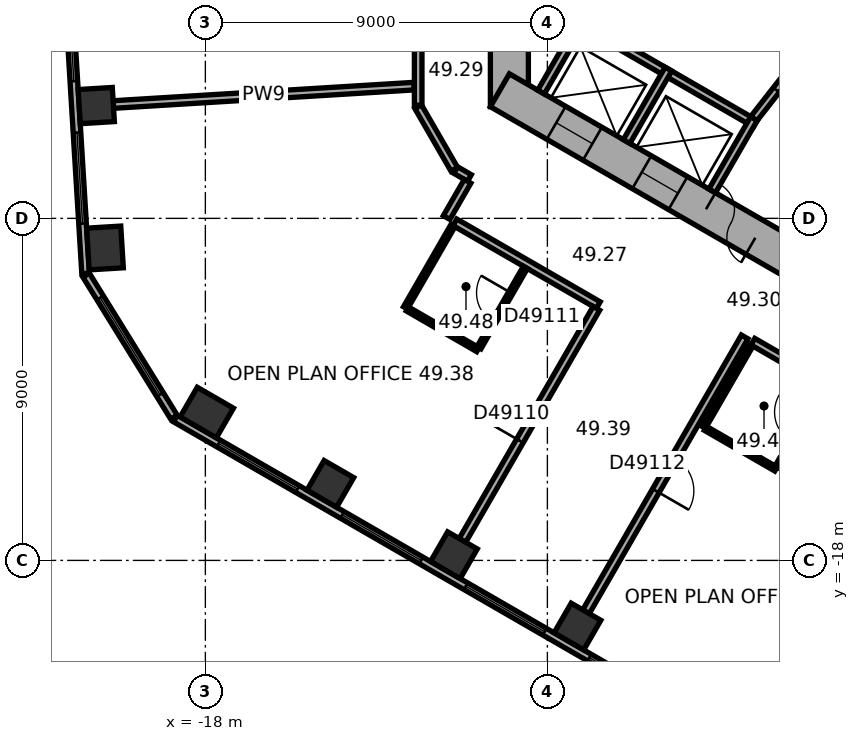
"""IFC4 building model, lengths in metres.
Left out: names, types, materials, properties, quantities, classifications, styles, units other than length and angle.
Written with IfcOpenShell. Run it as: python <this file> out.ifc"""

import sys

from ifc_helpers import new_model, si_unit, direction, frame, frame_2d, origin, origin_2d, place, context, subcontext, project, spatial, rectangle, extrude, element, fill, save


model = new_model("IFC4")
c1 = context("Model", 3, precision=1e-05, world=origin(), true_north=direction((0.0, 1.0)))
c2 = subcontext(c1, "Body", "Model", "MODEL_VIEW")
j1 = project(units=[si_unit("LENGTHUNIT", "METRE"), si_unit("PLANEANGLEUNIT", "RADIAN")], contexts=[c1])
p1 = place(None, origin())
s1 = spatial("IfcSite", under=j1, at=p1, CompositionType="ELEMENT")
p2 = place(p1, origin())
s2 = spatial("IfcBuilding", under=s1, at=p2, CompositionType="ELEMENT")
p3 = place(p2, frame((0.0, 0.0, 198.4)))
s3 = spatial("IfcBuildingStorey", under=s2, at=p3, CompositionType="ELEMENT", Elevation=198.4)
p4 = place(p3, frame((-20.871, -6.032, 0.0), z_axis=(0.0, 0.0, 1.0), x_axis=(0.061048539535, -0.998134798422, 0.0)))
e1 = element("IfcColumn", 1, at=p4, inside=s3, PredefinedType="COLUMN", context=c2, shape_type="SweptSolid", body=[
    extrude(rectangle(XDim=0.9, YDim=0.9, at=origin_2d()), origin(), (0.0, 0.0, 1.0), 3.7),
])
for number, where, z_axis, x_axis in (
    (2, (-20.642, -9.779, 0.0), (0.0, 0.0, 1.0), (0.061, -0.998, 0.0)),
    (3, (-17.962, -14.109, 0.0), (0.0, 0.0, 1.0), (0.866, -0.5, 0.0)),
):
    element("IfcColumn", number, at=place(p3, frame(where, z_axis=z_axis, x_axis=x_axis)), inside=s3, PredefinedType="COLUMN", context=c2, shape_type="SweptSolid", body=[
        extrude(rectangle(XDim=1.1, YDim=0.9, at=origin_2d()), origin(), (0.0, 0.0, 1.0), 3.7),
    ])
for number, where, z_axis, x_axis in (
    (4, (-14.711, -15.986, 0.0), (0.0, 0.0, 1.0), (0.866, -0.5, 0.0)),
    (5, (-11.46, -17.863, 0.0), (0.0, 0.0, 1.0), (0.866, -0.5, 0.0)),
    (6, (-8.208, -19.74, 0.0), (0.0, 0.0, 1.0), (0.866, -0.5, 0.0)),
):
    element("IfcColumn", number, at=place(p3, frame(where, z_axis=z_axis, x_axis=x_axis)), inside=s3, PredefinedType="COLUMN", context=c2, shape_type="SweptSolid", body=[
        extrude(rectangle(XDim=0.9, YDim=0.9, at=origin_2d()), origin(), (0.0, 0.0, 1.0), 3.7),
    ])
p5 = place(p3, frame((-10.0, 6.062, 0.0), z_axis=(0.0, 0.0, 1.0), x_axis=(0.0, -1.0, 0.0)))
e7 = element("IfcWall", 7, at=p5, inside=s3, PredefinedType="SHEAR", context=c2, shape_type="SweptSolid", body=[
    extrude(rectangle(XDim=12.125, YDim=1.0, at=frame_2d((6.062, 0.0))), origin(), (0.0, 0.0, 1.0), 3.7),
])
p6 = place(p5, frame((5.212, 0.0, 0.0)))
e8 = element("IfcOpeningElement", 8, at=p6, cuts=e7, PredefinedType="OPENING", context=c2, shape_type="SweptSolid", body=[
    extrude(rectangle(XDim=1.1, YDim=2.1, at=frame_2d((0.55, 1.05))), frame((0.0, 0.51, 0.0), z_axis=(0.0, -1.0, 0.0), x_axis=(1.0, 0.0, 0.0)), (0.0, 0.0, 1.0), 1.02),
])
p7 = place(p5, frame((7.812, 0.0, 0.0)))
e9 = element("IfcOpeningElement", 9, at=p7, cuts=e7, PredefinedType="OPENING", context=c2, shape_type="SweptSolid", body=[
    extrude(rectangle(XDim=1.1, YDim=2.1, at=frame_2d((0.55, 1.05))), frame((0.0, 0.51, 0.0), z_axis=(0.0, -1.0, 0.0), x_axis=(1.0, 0.0, 0.0)), (0.0, 0.0, 1.0), 1.02),
])
p8 = place(p3, frame((-10.25, -5.629, 0.0), z_axis=(0.0, 0.0, 1.0), x_axis=(0.866022616891, -0.50000482701, 0.0)))
e10 = element("IfcWall", 10, at=p8, inside=s3, PredefinedType="SHEAR", context=c2, shape_type="SweptSolid", body=[
    extrude(rectangle(XDim=12.125, YDim=1.0, at=frame_2d((6.062, 0.0))), origin(), (0.0, 0.0, 1.0), 3.7),
])
p9 = place(p8, frame((6.262, 0.0, 0.0)))
e11 = element("IfcOpeningElement", 11, at=p9, cuts=e10, PredefinedType="OPENING", context=c2, shape_type="SweptSolid", body=[
    extrude(rectangle(XDim=1.5, YDim=2.1, at=frame_2d((0.75, 1.05))), frame((0.0, 0.51, 0.0), z_axis=(0.0, -1.0, 0.0), x_axis=(1.0, 0.0, 0.0)), (0.0, 0.0, 1.0), 1.02),
])
p10 = place(p8, frame((1.712, 0.0, 0.0)))
e12 = element("IfcOpeningElement", 12, at=p10, cuts=e10, PredefinedType="OPENING", context=c2, shape_type="SweptSolid", body=[
    extrude(rectangle(XDim=1.1, YDim=2.1, at=frame_2d((0.55, 1.05))), frame((0.0, 0.51, 0.0), z_axis=(0.0, -1.0, 0.0), x_axis=(1.0, 0.0, 0.0)), (0.0, 0.0, 1.0), 1.02),
])
p11 = place(p8, frame((4.312, 0.0, 0.0)))
e13 = element("IfcOpeningElement", 13, at=p11, cuts=e10, PredefinedType="OPENING", context=c2, shape_type="SweptSolid", body=[
    extrude(rectangle(XDim=1.1, YDim=2.1, at=frame_2d((0.55, 1.05))), frame((0.0, 0.51, 0.0), z_axis=(0.0, -1.0, 0.0), x_axis=(1.0, 0.0, 0.0)), (0.0, 0.0, 1.0), 1.02),
])
p12 = place(p3, frame((-22.375, 9.557, 0.0), z_axis=(0.0, 0.0, 1.0), x_axis=(0.061036015339, -0.998135564356, 0.0)))
e14 = element("IfcWall", 14, at=p12, inside=s3, PredefinedType="STANDARD", context=c2, shape_type="SweptSolid", body=[
    extrude(rectangle(XDim=20.044, YDim=0.2, at=frame_2d((10.022, 0.0))), origin(), (0.0, 0.0, 1.0), 3.7),
])
p13 = place(p12, frame((1.313, 0.0, 0.9)))
e15 = element("IfcOpeningElement", 15, at=p13, cuts=e14, PredefinedType="OPENING", context=c2, shape_type="SweptSolid", body=[
    extrude(rectangle(XDim=2.4, YDim=2.0, at=frame_2d((1.2, 1.0))), frame((0.0, 0.11, 0.0), z_axis=(0.0, -1.0, 0.0), x_axis=(1.0, 0.0, 0.0)), (0.0, 0.0, 1.0), 0.22),
])
p14 = place(p12, frame((5.067, 0.0, 0.9)))
e16 = element("IfcOpeningElement", 16, at=p14, cuts=e14, PredefinedType="OPENING", context=c2, shape_type="SweptSolid", body=[
    extrude(rectangle(XDim=2.4, YDim=2.0, at=frame_2d((1.2, 1.0))), frame((0.0, 0.11, 0.0), z_axis=(0.0, -1.0, 0.0), x_axis=(1.0, 0.0, 0.0)), (0.0, 0.0, 1.0), 0.22),
])
p15 = place(p12, frame((8.821, 0.0, 0.9)))
e17 = element("IfcOpeningElement", 17, at=p15, cuts=e14, PredefinedType="OPENING", context=c2, shape_type="SweptSolid", body=[
    extrude(rectangle(XDim=2.4, YDim=2.0, at=frame_2d((1.2, 1.0))), frame((0.0, 0.11, 0.0), z_axis=(0.0, -1.0, 0.0), x_axis=(1.0, 0.0, 0.0)), (0.0, 0.0, 1.0), 0.22),
])
p16 = place(p12, frame((12.575, 0.0, 0.9)))
e18 = element("IfcOpeningElement", 18, at=p16, cuts=e14, PredefinedType="OPENING", context=c2, shape_type="SweptSolid", body=[
    extrude(rectangle(XDim=2.4, YDim=2.0, at=frame_2d((1.2, 1.0))), frame((0.0, 0.11, 0.0), z_axis=(0.0, -1.0, 0.0), x_axis=(1.0, 0.0, 0.0)), (0.0, 0.0, 1.0), 0.22),
])
p17 = place(p12, frame((16.329, 0.0, 0.9)))
e19 = element("IfcOpeningElement", 19, at=p17, cuts=e14, PredefinedType="OPENING", context=c2, shape_type="SweptSolid", body=[
    extrude(rectangle(XDim=2.4, YDim=2.0, at=frame_2d((1.2, 1.0))), frame((0.0, 0.11, 0.0), z_axis=(0.0, -1.0, 0.0), x_axis=(1.0, 0.0, 0.0)), (0.0, 0.0, 1.0), 0.22),
])
p18 = place(p3, frame((-21.137, -10.496, 0.0), z_axis=(0.0, 0.0, 1.0), x_axis=(0.526178661629, -0.850374044786, 0.0)))
e20 = element("IfcWall", 20, at=p18, inside=s3, PredefinedType="STANDARD", context=c2, shape_type="SweptSolid", body=[
    extrude(rectangle(XDim=4.395, YDim=0.2, at=frame_2d((2.197, 0.0))), origin(), (0.0, 0.0, 1.0), 3.7),
])
p19 = place(p18, frame((0.698, 0.0, 0.9)))
e21 = element("IfcOpeningElement", 21, at=p19, cuts=e20, PredefinedType="OPENING", context=c2, shape_type="SweptSolid", body=[
    extrude(rectangle(XDim=3.0, YDim=2.0, at=frame_2d((1.5, 1.0))), frame((0.0, 0.11, 0.0), z_axis=(0.0, -1.0, 0.0), x_axis=(1.0, 0.0, 0.0)), (0.0, 0.0, 1.0), 0.22),
])
p20 = place(p3, frame((-18.789, -14.267, 0.0), z_axis=(0.0, 0.0, 1.0), x_axis=(0.866023315909, -0.500003616288, 0.0)))
e22 = element("IfcWall", 22, at=p20, inside=s3, PredefinedType="STANDARD", context=c2, shape_type="SweptSolid", body=[
    extrude(rectangle(XDim=20.044, YDim=0.2, at=frame_2d((10.022, 0.0))), origin(), (0.0, 0.0, 1.0), 3.7),
])
p21 = place(p20, frame((1.314, 0.0, 0.9)))
e23 = element("IfcOpeningElement", 23, at=p21, cuts=e22, PredefinedType="OPENING", context=c2, shape_type="SweptSolid", body=[
    extrude(rectangle(XDim=2.4, YDim=2.0, at=frame_2d((1.2, 1.0))), frame((0.0, 0.11, 0.0), z_axis=(0.0, -1.0, 0.0), x_axis=(1.0, 0.0, 0.0)), (0.0, 0.0, 1.0), 0.22),
])
p22 = place(p20, frame((5.069, 0.0, 0.9)))
e24 = element("IfcOpeningElement", 24, at=p22, cuts=e22, PredefinedType="OPENING", context=c2, shape_type="SweptSolid", body=[
    extrude(rectangle(XDim=2.4, YDim=2.0, at=frame_2d((1.2, 1.0))), frame((0.0, 0.11, 0.0), z_axis=(0.0, -1.0, 0.0), x_axis=(1.0, 0.0, 0.0)), (0.0, 0.0, 1.0), 0.22),
])
p23 = place(p20, frame((8.823, 0.0, 0.9)))
e25 = element("IfcOpeningElement", 25, at=p23, cuts=e22, PredefinedType="OPENING", context=c2, shape_type="SweptSolid", body=[
    extrude(rectangle(XDim=2.4, YDim=2.0, at=frame_2d((1.2, 1.0))), frame((0.0, 0.11, 0.0), z_axis=(0.0, -1.0, 0.0), x_axis=(1.0, 0.0, 0.0)), (0.0, 0.0, 1.0), 0.22),
])
p24 = place(p20, frame((12.577, 0.0, 0.9)))
e26 = element("IfcOpeningElement", 26, at=p24, cuts=e22, PredefinedType="OPENING", context=c2, shape_type="SweptSolid", body=[
    extrude(rectangle(XDim=2.4, YDim=2.0, at=frame_2d((1.2, 1.0))), frame((0.0, 0.11, 0.0), z_axis=(0.0, -1.0, 0.0), x_axis=(1.0, 0.0, 0.0)), (0.0, 0.0, 1.0), 0.22),
])
p25 = place(p20, frame((16.331, 0.0, 0.9)))
e27 = element("IfcOpeningElement", 27, at=p25, cuts=e22, PredefinedType="OPENING", context=c2, shape_type="SweptSolid", body=[
    extrude(rectangle(XDim=2.4, YDim=2.0, at=frame_2d((1.2, 1.0))), frame((0.0, 0.11, 0.0), z_axis=(0.0, -1.0, 0.0), x_axis=(1.0, 0.0, 0.0)), (0.0, 0.0, 1.0), 0.22),
])
p26 = place(p3, frame((-8.203, -3.809, 0.0), z_axis=(0.0, 0.0, 1.0), x_axis=(0.866028230842, -0.499995103361, 0.0)))
e28 = element("IfcWall", 28, at=p26, inside=s3, PredefinedType="PARTITIONING", context=c2, shape_type="SweptSolid", body=[
    extrude(rectangle(XDim=5.4, YDim=0.2, at=frame_2d((2.7, 0.0))), origin(), (0.0, 0.0, 1.0), 3.42),
])
for number, where, z_axis, x_axis in (
    (29, (-8.067, -3.772, 0.0), (0.0, 0.0, 1.0), (-0.5, -0.866, 0.0)),
    (30, (-5.815, -5.072, 0.0), (0.0, 0.0, 1.0), (-0.5, -0.866, 0.0)),
):
    element("IfcWall", number, at=place(p3, frame(where, z_axis=z_axis, x_axis=x_axis)), inside=s3, PredefinedType="PARTITIONING", context=c2, shape_type="SweptSolid", body=[
        extrude(rectangle(XDim=2.2, YDim=0.2, at=frame_2d((1.1, 0.0))), origin(), (0.0, 0.0, 1.0), 3.42),
    ])
p27 = place(p3, frame((-3.563, -6.372, 0.0), z_axis=(0.0, 0.0, 1.0), x_axis=(-0.499994660107, -0.866028486751, 0.0)))
e31 = element("IfcWall", 31, at=p27, inside=s3, PredefinedType="PARTITIONING", context=c2, shape_type="SweptSolid", body=[
    extrude(rectangle(XDim=2.2, YDim=0.2, at=frame_2d((1.1, 0.0))), origin(), (0.0, 0.0, 1.0), 3.42),
])
p28 = place(p3, frame((-1.712, -4.008, 0.0), z_axis=(0.0, 0.0, 1.0), x_axis=(-0.616549420702, -0.787316208287, 0.0)))
e32 = element("IfcWall", 32, at=p28, inside=s3, PredefinedType="PARTITIONING", context=c2, shape_type="SweptSolid", body=[
    extrude(rectangle(XDim=3.002, YDim=0.2, at=frame_2d((1.501, 0.0))), origin(), (0.0, 0.0, 1.0), 3.42),
])
p29 = place(p28, frame((1.15, 0.0, 0.0)))
e33 = element("IfcOpeningElement", 33, at=p29, cuts=e32, PredefinedType="OPENING", context=c2, shape_type="SweptSolid", body=[
    extrude(rectangle(XDim=0.9, YDim=2.1, at=frame_2d((0.45, 1.05))), frame((0.0, 0.11, 0.0), z_axis=(0.0, -1.0, 0.0), x_axis=(1.0, 0.0, 0.0)), (0.0, 0.0, 1.0), 0.22),
])
p30 = place(p3, frame((-20.421, -6.005, 0.0), z_axis=(0.0, 0.0, 1.0), x_axis=(0.998134865741, 0.061047438866, 0.0)))
e34 = element("IfcWall", 34, at=p30, inside=s3, PredefinedType="PARTITIONING", context=c2, shape_type="SweptSolid", body=[
    extrude(rectangle(XDim=7.927, YDim=0.2, at=frame_2d((3.963, 0.0))), origin(), (0.0, 0.0, 1.0), 2.87),
])
p31 = place(p3, frame((-12.735, -11.355, 0.0), z_axis=(0.0, 0.0, 1.0), x_axis=(0.500004234368, 0.866022959057, 0.0)))
e35 = element("IfcWall", 35, at=p31, inside=s3, PredefinedType="PARTITIONING", context=c2, shape_type="SweptSolid", body=[
    extrude(rectangle(XDim=2.5, YDim=0.12, at=frame_2d((1.25, 0.0))), origin(), (0.0, 0.0, 1.0), 3.42),
])
p32 = place(p3, frame((-12.4, -6.062, 0.0), z_axis=(0.0, 0.0, 1.0), x_axis=(0.500022797313, -0.86601224135, 0.0)))
e36 = element("IfcWall", 36, at=p32, inside=s3, PredefinedType="PARTITIONING", context=c2, shape_type="SweptSolid", body=[
    extrude(rectangle(XDim=1.9, YDim=0.2, at=frame_2d((0.95, 0.0))), origin(), (0.0, 0.0, 1.0), 3.42),
])
p33 = place(p3, frame((-12.4, -4.201, 0.0), z_axis=(0.0, 0.0, 1.0), x_axis=(0.0, -1.0, 0.0)))
e37 = element("IfcWall", 37, at=p33, inside=s3, PredefinedType="PARTITIONING", context=c2, shape_type="SweptSolid", body=[
    extrude(rectangle(XDim=1.821, YDim=0.2, at=frame_2d((0.911, 0.0))), origin(), (0.0, 0.0, 1.0), 3.42),
])
p34 = place(p3, frame((-11.435, -9.103, 0.0), z_axis=(0.0, 0.0, 1.0), x_axis=(0.866007399799, -0.500031182522, 0.0)))
e38 = element("IfcWall", 38, at=p34, inside=s3, PredefinedType="PARTITIONING", context=c2, shape_type="SweptSolid", body=[
    extrude(rectangle(XDim=4.358, YDim=0.2, at=frame_2d((2.179, 0.0))), origin(), (0.0, 0.0, 1.0), 3.42),
])
p35 = place(p3, frame((-11.415, -7.728, 0.0), z_axis=(0.0, 0.0, 1.0), x_axis=(0.865915281873, -0.500190688257, 0.0)))
e39 = element("IfcWall", 39, at=p35, inside=s3, PredefinedType="PARTITIONING", context=c2, shape_type="SweptSolid", body=[
    extrude(rectangle(XDim=0.421, YDim=0.2, at=frame_2d((0.21, 0.0))), origin(), (0.0, 0.0, 1.0), 3.42),
])
p36 = place(p3, frame((-11.235, -17.474, 0.0), z_axis=(0.0, 0.0, 1.0), x_axis=(0.500009260695, 0.866020057054, 0.0)))
e40 = element("IfcWall", 40, at=p36, inside=s3, PredefinedType="PARTITIONING", context=c2, shape_type="SweptSolid", body=[
    extrude(rectangle(XDim=7.049, YDim=0.2, at=frame_2d((3.524, 0.0))), origin(), (0.0, 0.0, 1.0), 2.87),
])
p37 = place(p36, frame((3.024, 0.0, 0.0)))
e41 = element("IfcOpeningElement", 41, at=p37, cuts=e40, PredefinedType="OPENING", context=c2, shape_type="SweptSolid", body=[
    extrude(rectangle(XDim=1.0, YDim=2.1, at=frame_2d((0.5, 1.05))), frame((0.0, 0.11, 0.0), z_axis=(0.0, -1.0, 0.0), x_axis=(1.0, 0.0, 0.0)), (0.0, 0.0, 1.0), 0.22),
])
p38 = place(p3, frame((-11.101, -8.025, 0.0), z_axis=(0.0, 0.0, 1.0), x_axis=(-0.500074377092, -0.865982457891, 0.0)))
e42 = element("IfcWall", 42, at=p38, inside=s3, PredefinedType="PARTITIONING", context=c2, shape_type="SweptSolid", body=[
    extrude(rectangle(XDim=1.101, YDim=0.2, at=frame_2d((0.55, 0.0))), origin(), (0.0, 0.0, 1.0), 3.42),
])
p39 = place(p3, frame((-10.829, -12.455, 0.0), z_axis=(0.0, 0.0, 1.0), x_axis=(-0.86600889856, 0.500028586798, 0.0)))
e43 = element("IfcWall", 43, at=p39, inside=s3, PredefinedType="PARTITIONING", context=c2, shape_type="SweptSolid", body=[
    extrude(rectangle(XDim=2.14, YDim=0.12, at=frame_2d((1.07, 0.0))), origin(), (0.0, 0.0, 1.0), 3.42),
])
p40 = place(p3, frame((-9.579, -10.29, 0.0), z_axis=(0.0, 0.0, 1.0), x_axis=(-0.499959183527, -0.866048967903, 0.0)))
e44 = element("IfcWall", 44, at=p40, inside=s3, PredefinedType="PARTITIONING", context=c2, shape_type="SweptSolid", body=[
    extrude(rectangle(XDim=2.44, YDim=0.12, at=frame_2d((1.22, 0.0))), origin(), (0.0, 0.0, 1.0), 3.42),
])
p41 = place(p40, frame((0.77, 0.0, 0.0)))
e45 = element("IfcOpeningElement", 45, at=p41, cuts=e44, PredefinedType="OPENING", context=c2, shape_type="SweptSolid", body=[
    extrude(rectangle(XDim=0.9, YDim=2.1, at=frame_2d((0.45, 1.05))), frame((0.0, 0.07, 0.0), z_axis=(0.0, -1.0, 0.0), x_axis=(1.0, 0.0, 0.0)), (0.0, 0.0, 1.0), 0.14),
])
p42 = place(p3, frame((-7.984, -19.351, 0.0), z_axis=(0.0, 0.0, 1.0), x_axis=(0.500010139422, 0.866019549707, 0.0)))
e46 = element("IfcWall", 46, at=p42, inside=s3, PredefinedType="PARTITIONING", context=c2, shape_type="SweptSolid", body=[
    extrude(rectangle(XDim=8.35, YDim=0.2, at=frame_2d((4.175, 0.0))), origin(), (0.0, 0.0, 1.0), 3.42),
])
p43 = place(p42, frame((3.675, 0.0, 0.0)))
e47 = element("IfcOpeningElement", 47, at=p43, cuts=e46, PredefinedType="OPENING", context=c2, shape_type="SweptSolid", body=[
    extrude(rectangle(XDim=1.0, YDim=2.1, at=frame_2d((0.5, 1.05))), frame((0.0, 0.11, 0.0), z_axis=(0.0, -1.0, 0.0), x_axis=(1.0, 0.0, 0.0)), (0.0, 0.0, 1.0), 0.22),
])
p44 = place(p3, frame((-4.892, -14.496, 0.0), z_axis=(0.0, 0.0, 1.0), x_axis=(0.500004234368, 0.866022959057, 0.0)))
e48 = element("IfcWall", 48, at=p44, inside=s3, PredefinedType="PARTITIONING", context=c2, shape_type="SweptSolid", body=[
    extrude(rectangle(XDim=2.5, YDim=0.12, at=frame_2d((1.25, 0.0))), origin(), (0.0, 0.0, 1.0), 3.42),
])
p45 = place(p3, frame((-3.592, -12.244, 0.0), z_axis=(0.0, 0.0, 1.0), x_axis=(0.866028335764, -0.499994921628, 0.0)))
e49 = element("IfcWall", 49, at=p45, inside=s3, PredefinedType="PARTITIONING", context=c2, shape_type="SweptSolid", body=[
    extrude(rectangle(XDim=3.051, YDim=0.2, at=frame_2d((1.525, 0.0))), origin(), (0.0, 0.0, 1.0), 3.42),
])
p46 = place(p3, frame((-2.987, -15.596, 0.0), z_axis=(0.0, 0.0, 1.0), x_axis=(-0.86600889856, 0.500028586798, 0.0)))
e50 = element("IfcWall", 50, at=p46, inside=s3, PredefinedType="PARTITIONING", context=c2, shape_type="SweptSolid", body=[
    extrude(rectangle(XDim=2.14, YDim=0.12, at=frame_2d((1.07, 0.0))), origin(), (0.0, 0.0, 1.0), 3.42),
])
p47 = place(p3, frame((-1.737, -13.431, 0.0), z_axis=(0.0, 0.0, 1.0), x_axis=(-0.499959183527, -0.866048967903, 0.0)))
e51 = element("IfcWall", 51, at=p47, inside=s3, PredefinedType="PARTITIONING", context=c2, shape_type="SweptSolid", body=[
    extrude(rectangle(XDim=2.44, YDim=0.12, at=frame_2d((1.22, 0.0))), origin(), (0.0, 0.0, 1.0), 3.42),
])
p48 = place(p47, frame((0.77, 0.0, 0.0)))
e52 = element("IfcOpeningElement", 52, at=p48, cuts=e51, PredefinedType="OPENING", context=c2, shape_type="SweptSolid", body=[
    extrude(rectangle(XDim=0.9, YDim=2.1, at=frame_2d((0.45, 1.05))), frame((0.0, 0.07, 0.0), z_axis=(0.0, -1.0, 0.0), x_axis=(1.0, 0.0, 0.0)), (0.0, 0.0, 1.0), 0.14),
])
p49 = place(p16, origin())
e53 = element("IfcWindow", 53, at=p49, inside=s3, PartitioningType="SINGLE_PANEL", PredefinedType="WINDOW", context=c2, shape_type="SweptSolid", body=[
    extrude(rectangle(XDim=2.4, YDim=2.0, at=frame_2d((1.2, 1.0))), frame((0.0, 0.03, 0.0), z_axis=(0.0, -1.0, 0.0), x_axis=(1.0, 0.0, 0.0)), (0.0, 0.0, 1.0), 0.06),
])
fill(e18, e53)
p50 = place(p17, origin())
e54 = element("IfcWindow", 54, at=p50, inside=s3, PartitioningType="SINGLE_PANEL", PredefinedType="WINDOW", context=c2, shape_type="SweptSolid", body=[
    extrude(rectangle(XDim=2.4, YDim=2.0, at=frame_2d((1.2, 1.0))), frame((0.0, 0.03, 0.0), z_axis=(0.0, -1.0, 0.0), x_axis=(1.0, 0.0, 0.0)), (0.0, 0.0, 1.0), 0.06),
])
fill(e19, e54)
p51 = place(p19, origin())
e55 = element("IfcWindow", 55, at=p51, inside=s3, PartitioningType="SINGLE_PANEL", PredefinedType="WINDOW", context=c2, shape_type="SweptSolid", body=[
    extrude(rectangle(XDim=3.0, YDim=2.0, at=frame_2d((1.5, 1.0))), frame((0.0, 0.03, 0.0), z_axis=(0.0, -1.0, 0.0), x_axis=(1.0, 0.0, 0.0)), (0.0, 0.0, 1.0), 0.06),
])
fill(e21, e55)
p52 = place(p21, origin())
e56 = element("IfcWindow", 56, at=p52, inside=s3, PartitioningType="SINGLE_PANEL", PredefinedType="WINDOW", context=c2, shape_type="SweptSolid", body=[
    extrude(rectangle(XDim=2.4, YDim=2.0, at=frame_2d((1.2, 1.0))), frame((0.0, 0.03, 0.0), z_axis=(0.0, -1.0, 0.0), x_axis=(1.0, 0.0, 0.0)), (0.0, 0.0, 1.0), 0.06),
])
fill(e23, e56)
p53 = place(p22, origin())
e57 = element("IfcWindow", 57, at=p53, inside=s3, PartitioningType="SINGLE_PANEL", PredefinedType="WINDOW", context=c2, shape_type="SweptSolid", body=[
    extrude(rectangle(XDim=2.4, YDim=2.0, at=frame_2d((1.2, 1.0))), frame((0.0, 0.03, 0.0), z_axis=(0.0, -1.0, 0.0), x_axis=(1.0, 0.0, 0.0)), (0.0, 0.0, 1.0), 0.06),
])
fill(e24, e57)
p54 = place(p23, origin())
e58 = element("IfcWindow", 58, at=p54, inside=s3, PartitioningType="SINGLE_PANEL", PredefinedType="WINDOW", context=c2, shape_type="SweptSolid", body=[
    extrude(rectangle(XDim=2.4, YDim=2.0, at=frame_2d((1.2, 1.0))), frame((0.0, 0.03, 0.0), z_axis=(0.0, -1.0, 0.0), x_axis=(1.0, 0.0, 0.0)), (0.0, 0.0, 1.0), 0.06),
])
fill(e25, e58)
p55 = place(p24, origin())
e59 = element("IfcWindow", 59, at=p55, inside=s3, PartitioningType="SINGLE_PANEL", PredefinedType="WINDOW", context=c2, shape_type="SweptSolid", body=[
    extrude(rectangle(XDim=2.4, YDim=2.0, at=frame_2d((1.2, 1.0))), frame((0.0, 0.03, 0.0), z_axis=(0.0, -1.0, 0.0), x_axis=(1.0, 0.0, 0.0)), (0.0, 0.0, 1.0), 0.06),
])
fill(e26, e59)
p56 = place(p9, origin())
e60 = element("IfcDoor", 60, at=p56, inside=s3, OperationType="DOUBLE_DOOR_SINGLE_SWING", PredefinedType="DOOR", context=c2, shape_type="SweptSolid", body=[
    extrude(rectangle(XDim=1.5, YDim=2.1, at=frame_2d((0.75, 1.05))), frame((0.0, 0.025, 0.0), z_axis=(0.0, -1.0, 0.0), x_axis=(1.0, 0.0, 0.0)), (0.0, 0.0, 1.0), 0.05),
])
fill(e11, e60)
p57 = place(p29, origin())
e61 = element("IfcDoor", 61, at=p57, inside=s3, OperationType="SINGLE_SWING_LEFT", PredefinedType="DOOR", context=c2, shape_type="SweptSolid", body=[
    extrude(rectangle(XDim=0.9, YDim=2.1, at=frame_2d((0.45, 1.05))), frame((0.0, 0.025, 0.0), z_axis=(0.0, -1.0, 0.0), x_axis=(1.0, 0.0, 0.0)), (0.0, 0.0, 1.0), 0.05),
])
fill(e33, e61)
p58 = place(p10, origin())
e62 = element("IfcDoor", 62, at=p58, inside=s3, OperationType="DOUBLE_DOOR_SLIDING", PredefinedType="DOOR", context=c2, shape_type="SweptSolid", body=[
    extrude(rectangle(XDim=1.1, YDim=2.1, at=frame_2d((0.55, 1.05))), frame((0.0, 0.025, 0.0), z_axis=(0.0, -1.0, 0.0), x_axis=(1.0, 0.0, 0.0)), (0.0, 0.0, 1.0), 0.05),
])
fill(e12, e62)
p59 = place(p11, origin())
e63 = element("IfcDoor", 63, at=p59, inside=s3, OperationType="DOUBLE_DOOR_SLIDING", PredefinedType="DOOR", context=c2, shape_type="SweptSolid", body=[
    extrude(rectangle(XDim=1.1, YDim=2.1, at=frame_2d((0.55, 1.05))), frame((0.0, 0.025, 0.0), z_axis=(0.0, -1.0, 0.0), x_axis=(1.0, 0.0, 0.0)), (0.0, 0.0, 1.0), 0.05),
])
fill(e13, e63)
p60 = place(p37, origin())
e64 = element("IfcDoor", 64, at=p60, inside=s3, OperationType="SINGLE_SWING_LEFT", PredefinedType="DOOR", context=c2, shape_type="SweptSolid", body=[
    extrude(rectangle(XDim=1.0, YDim=2.1, at=frame_2d((0.5, 1.05))), frame((0.0, 0.025, 0.0), z_axis=(0.0, -1.0, 0.0), x_axis=(1.0, 0.0, 0.0)), (0.0, 0.0, 1.0), 0.05),
])
fill(e41, e64)
p61 = place(p41, origin())
e65 = element("IfcDoor", 65, at=p61, inside=s3, OperationType="SINGLE_SWING_LEFT", PredefinedType="DOOR", context=c2, shape_type="SweptSolid", body=[
    extrude(rectangle(XDim=0.9, YDim=2.1, at=frame_2d((0.45, 1.05))), frame((0.0, 0.025, 0.0), z_axis=(0.0, -1.0, 0.0), x_axis=(1.0, 0.0, 0.0)), (0.0, 0.0, 1.0), 0.05),
])
fill(e45, e65)
p62 = place(p43, origin())
e66 = element("IfcDoor", 66, at=p62, inside=s3, OperationType="SINGLE_SWING_LEFT", PredefinedType="DOOR", context=c2, shape_type="SweptSolid", body=[
    extrude(rectangle(XDim=1.0, YDim=2.1, at=frame_2d((0.5, 1.05))), frame((0.0, 0.025, 0.0), z_axis=(0.0, -1.0, 0.0), x_axis=(1.0, 0.0, 0.0)), (0.0, 0.0, 1.0), 0.05),
])
fill(e47, e66)
save(model, sys.argv[1])
